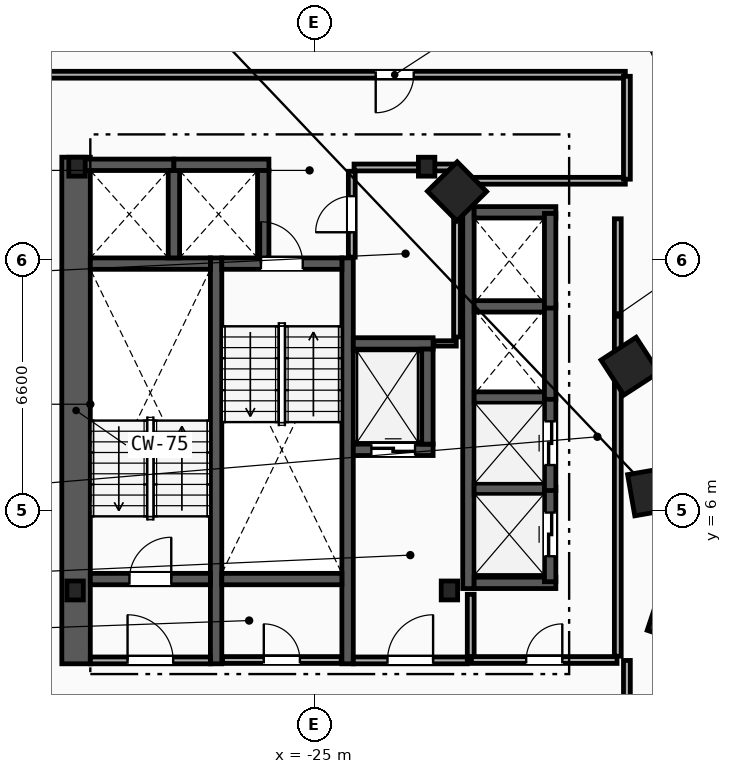
"""IFC4 building model, lengths in metres.
Left out: names, types, materials, properties, quantities, classifications, styles, units other than length and angle.
Written with IfcOpenShell. Run it as: python <this file> out.ifc"""

import sys

from ifc_helpers import new_model, si_unit, direction, frame, frame_2d, origin, origin_2d, place, context, subcontext, project, spatial, rectangle, i_section, extrude, element, fill, save


model = new_model("IFC4")
c1 = context("Model", 3, precision=1e-05, world=origin(), true_north=direction((0.0, 1.0)))
c2 = subcontext(c1, "Body", "Model", "MODEL_VIEW")
j1 = project(units=[si_unit("LENGTHUNIT", "METRE"), si_unit("PLANEANGLEUNIT", "RADIAN")], contexts=[c1])
p1 = place(None, origin())
s1 = spatial("IfcSite", under=j1, at=p1, CompositionType="ELEMENT")
p2 = place(p1, origin())
s2 = spatial("IfcBuilding", under=s1, at=p2, CompositionType="ELEMENT")
p3 = place(p2, frame((0.0, 0.0, 107.0)))
s3 = spatial("IfcBuildingStorey", under=s2, at=p3, CompositionType="ELEMENT", Elevation=107.0)
for number, where, z_axis, x_axis in (
    (1, (-31.3, 3.9, 0.0), (0.0, 0.0, 1.0), (1.0, 0.0, 0.0)),
    (2, (-21.45, 3.9, 0.0), (0.0, 0.0, 1.0), (1.0, 0.0, 0.0)),
    (3, (-22.05, 15.05, 0.0), (0.0, 0.0, 1.0), (1.0, 0.0, 0.0)),
    (4, (-31.25, 15.05, 0.0), (0.0, 0.0, 1.0), (1.0, 0.0, 0.0)),
):
    element("IfcColumn", number, at=place(p3, frame(where, z_axis=z_axis, x_axis=x_axis)), inside=s3, PredefinedType="COLUMN", context=c2, shape_type="SweptSolid", body=[
        extrude(i_section(OverallWidth=0.432, OverallDepth=0.498, WebThickness=0.056, FlangeThickness=0.089, FilletRadius=0.018, at=origin_2d()), origin(), (0.0, 0.0, 1.0), 3.6),
    ])
for number, where, z_axis, x_axis in (
    (5, (-15.55, 3.2, 0.0), (0.0, 0.0, 1.0), (0.315, 0.949, 0.0)),
    (6, (-16.125, 6.5, 0.0), (0.0, 0.0, 1.0), (-0.172, 0.985, 0.0)),
    (7, (-16.7, 9.8, 0.0), (0.0, 0.0, 1.0), (-0.544, 0.839, 0.0)),
    (8, (-21.25, 14.4, 0.0), (0.0, 0.0, 1.0), (-0.703, 0.711, 0.0)),
):
    element("IfcColumn", number, at=place(p3, frame(where, z_axis=z_axis, x_axis=x_axis)), inside=s3, PredefinedType="COLUMN", context=c2, shape_type="SweptSolid", body=[
        extrude(rectangle(XDim=1.1, YDim=1.1, at=origin_2d()), origin(), (0.0, 0.0, 1.0), 3.6),
    ])
p4 = place(p3, frame((-31.275, 1.97, 0.0), z_axis=(0.0, 0.0, 1.0), x_axis=(0.0, 1.0, 0.0)))
e9 = element("IfcWall", 9, at=p4, inside=s3, PredefinedType="SHEAR", context=c2, shape_type="SweptSolid", body=[
    extrude(rectangle(XDim=13.33, YDim=0.75, at=frame_2d((6.665, 0.0))), origin(), (0.0, 0.0, 1.0), 3.3),
])
for number, where, z_axis, x_axis in (
    (10, (-27.59, 1.97, 0.0), (0.0, 0.0, 1.0), (0.0, 1.0, 0.0)),
    (11, (-24.13, 1.97, 0.0), (0.0, 0.0, 1.0), (0.0, 1.0, 0.0)),
):
    element("IfcWall", number, at=place(p3, frame(where, z_axis=z_axis, x_axis=x_axis)), inside=s3, PredefinedType="SHEAR", context=c2, shape_type="SweptSolid", body=[
        extrude(rectangle(XDim=10.68, YDim=0.3, at=frame_2d((5.34, 0.0))), origin(), (0.0, 0.0, 1.0), 3.3),
    ])
p5 = place(p3, frame((-30.9, 4.2, 0.0), z_axis=(0.0, 0.0, 1.0), x_axis=(1.0, 0.0, 0.0)))
e12 = element("IfcWall", 12, at=p5, inside=s3, PredefinedType="SHEAR", context=c2, shape_type="SweptSolid", body=[
    extrude(rectangle(XDim=3.16, YDim=0.3, at=frame_2d((1.58, 0.0))), origin(), (0.0, 0.0, 1.0), 3.3),
])
p6 = place(p5, frame((1.03, 0.0, 0.0)))
e13 = element("IfcOpeningElement", 13, at=p6, cuts=e12, PredefinedType="OPENING", context=c2, shape_type="SweptSolid", body=[
    extrude(rectangle(XDim=1.1, YDim=2.15, at=frame_2d((0.55, 1.075))), frame((0.0, 0.16, 0.0), z_axis=(0.0, -1.0, 0.0), x_axis=(1.0, 0.0, 0.0)), (0.0, 0.0, 1.0), 0.32),
])
p7 = place(p3, frame((-30.9, 12.5, 0.0), z_axis=(0.0, 0.0, 1.0), x_axis=(1.0, 0.0, 0.0)))
e14 = element("IfcWall", 14, at=p7, inside=s3, PredefinedType="SHEAR", context=c2, shape_type="SweptSolid", body=[
    extrude(rectangle(XDim=3.16, YDim=0.3, at=frame_2d((1.58, 0.0))), origin(), (0.0, 0.0, 1.0), 3.3),
])
p8 = place(p3, frame((-27.44, 12.5, 0.0), z_axis=(0.0, 0.0, 1.0), x_axis=(1.0, 0.0, 0.0)))
e15 = element("IfcWall", 15, at=p8, inside=s3, PredefinedType="SHEAR", context=c2, shape_type="SweptSolid", body=[
    extrude(rectangle(XDim=3.16, YDim=0.3, at=frame_2d((1.58, 0.0))), origin(), (0.0, 0.0, 1.0), 3.3),
])
p9 = place(p8, frame((1.03, 0.0, 0.0)))
e16 = element("IfcOpeningElement", 16, at=p9, cuts=e15, PredefinedType="OPENING", context=c2, shape_type="SweptSolid", body=[
    extrude(rectangle(XDim=1.1, YDim=2.15, at=frame_2d((0.55, 1.075))), frame((0.0, 0.16, 0.0), z_axis=(0.0, -1.0, 0.0), x_axis=(1.0, 0.0, 0.0)), (0.0, 0.0, 1.0), 0.32),
])
p10 = place(p3, frame((-27.44, 4.2, 0.0), z_axis=(0.0, 0.0, 1.0), x_axis=(1.0, 0.0, 0.0)))
e17 = element("IfcWall", 17, at=p10, inside=s3, PredefinedType="SHEAR", context=c2, shape_type="SweptSolid", body=[
    extrude(rectangle(XDim=3.16, YDim=0.3, at=frame_2d((1.58, 0.0))), origin(), (0.0, 0.0, 1.0), 3.3),
])
p11 = place(p3, frame((-20.89, 2.15, 0.0), z_axis=(0.0, 0.0, 1.0), x_axis=(0.0, 1.0, 0.0)))
e18 = element("IfcWall", 18, at=p11, inside=s3, PredefinedType="PARTITIONING", context=c2, shape_type="SweptSolid", body=[
    extrude(rectangle(XDim=1.65, YDim=0.18, at=frame_2d((0.825, 0.0))), origin(), (0.0, 0.0, 1.0), 3.3),
])
p12 = place(p3, frame((-23.98, 2.06, 0.0), z_axis=(0.0, 0.0, 1.0), x_axis=(1.0, 0.0, 0.0)))
e19 = element("IfcWall", 19, at=p12, inside=s3, PredefinedType="PARTITIONING", context=c2, shape_type="SweptSolid", body=[
    extrude(rectangle(XDim=3.0, YDim=0.18, at=frame_2d((1.5, 0.0))), origin(), (0.0, 0.0, 1.0), 3.3),
])
p13 = place(p12, frame((0.9, 0.0, 0.0)))
e20 = element("IfcOpeningElement", 20, at=p13, cuts=e19, PredefinedType="OPENING", context=c2, shape_type="SweptSolid", body=[
    extrude(rectangle(XDim=1.2, YDim=2.15, at=frame_2d((0.6, 1.075))), frame((0.0, 0.1, 0.0), z_axis=(0.0, -1.0, 0.0), x_axis=(1.0, 0.0, 0.0)), (0.0, 0.0, 1.0), 0.2),
])
p14 = place(p3, frame((-30.9, 2.06, 0.0), z_axis=(0.0, 0.0, 1.0), x_axis=(1.0, 0.0, 0.0)))
e21 = element("IfcWall", 21, at=p14, inside=s3, PredefinedType="PARTITIONING", context=c2, shape_type="SweptSolid", body=[
    extrude(rectangle(XDim=3.16, YDim=0.18, at=frame_2d((1.58, 0.0))), origin(), (0.0, 0.0, 1.0), 3.3),
])
p15 = place(p14, frame((0.98, 0.0, 0.0)))
e22 = element("IfcOpeningElement", 22, at=p15, cuts=e21, PredefinedType="OPENING", context=c2, shape_type="SweptSolid", body=[
    extrude(rectangle(XDim=1.2, YDim=2.15, at=frame_2d((0.6, 1.075))), frame((0.0, 0.1, 0.0), z_axis=(0.0, -1.0, 0.0), x_axis=(1.0, 0.0, 0.0)), (0.0, 0.0, 1.0), 0.2),
])
p16 = place(p3, frame((-23.98, 7.6, 0.0), z_axis=(0.0, 0.0, 1.0), x_axis=(1.0, 0.0, 0.0)))
e23 = element("IfcWall", 23, at=p16, inside=s3, PredefinedType="SHEAR", context=c2, shape_type="SweptSolid", body=[
    extrude(rectangle(XDim=2.1, YDim=0.3, at=frame_2d((1.05, 0.0))), origin(), (0.0, 0.0, 1.0), 3.3),
])
p17 = place(p16, frame((0.475, 0.0, 0.0)))
e24 = element("IfcOpeningElement", 24, at=p17, cuts=e23, PredefinedType="OPENING", context=c2, shape_type="SweptSolid", body=[
    extrude(rectangle(XDim=1.15, YDim=2.2, at=frame_2d((0.575, 1.1))), frame((0.0, 0.16, 0.0), z_axis=(0.0, -1.0, 0.0), x_axis=(1.0, 0.0, 0.0)), (0.0, 0.0, 1.0), 0.32),
])
p18 = place(p3, frame((-23.98, 10.4, 0.0), z_axis=(0.0, 0.0, 1.0), x_axis=(1.0, 0.0, 0.0)))
e25 = element("IfcWall", 25, at=p18, inside=s3, PredefinedType="SHEAR", context=c2, shape_type="SweptSolid", body=[
    extrude(rectangle(XDim=2.1, YDim=0.3, at=frame_2d((1.05, 0.0))), origin(), (0.0, 0.0, 1.0), 3.3),
])
for number, where, z_axis, x_axis in (
    (26, (-22.03, 7.75, 0.0), (0.0, 0.0, 1.0), (0.0, 1.0, 0.0)),
    (27, (-31.2, 15.1, 0.0), (0.0, 0.0, 1.0), (1.0, 0.0, 0.0)),
):
    element("IfcWall", number, at=place(p3, frame(where, z_axis=z_axis, x_axis=x_axis)), inside=s3, PredefinedType="SHEAR", context=c2, shape_type="SweptSolid", body=[
        extrude(rectangle(XDim=2.5, YDim=0.3, at=frame_2d((1.25, 0.0))), origin(), (0.0, 0.0, 1.0), 3.3),
    ])
p19 = place(p3, frame((-28.7, 12.65, 0.0), z_axis=(0.0, 0.0, 1.0), x_axis=(0.0, 1.0, 0.0)))
e28 = element("IfcWall", 28, at=p19, inside=s3, PredefinedType="SHEAR", context=c2, shape_type="SweptSolid", body=[
    extrude(rectangle(XDim=2.3, YDim=0.3, at=frame_2d((1.15, 0.0))), origin(), (0.0, 0.0, 1.0), 3.3),
])
p20 = place(p3, frame((-28.7, 15.1, 0.0), z_axis=(0.0, 0.0, 1.0), x_axis=(1.0, 0.0, 0.0)))
e29 = element("IfcWall", 29, at=p20, inside=s3, PredefinedType="SHEAR", context=c2, shape_type="SweptSolid", body=[
    extrude(rectangle(XDim=2.5, YDim=0.3, at=frame_2d((1.25, 0.0))), origin(), (0.0, 0.0, 1.0), 3.3),
])
p21 = place(p3, frame((-26.35, 12.65, 0.0), z_axis=(0.0, 0.0, 1.0), x_axis=(0.0, 1.0, 0.0)))
e30 = element("IfcWall", 30, at=p21, inside=s3, PredefinedType="SHEAR", context=c2, shape_type="SweptSolid", body=[
    extrude(rectangle(XDim=2.3, YDim=0.3, at=frame_2d((1.15, 0.0))), origin(), (0.0, 0.0, 1.0), 3.3),
])
p22 = place(p3, frame((-20.95, 3.95, 0.0), z_axis=(0.0, 0.0, 1.0), x_axis=(0.0, 1.0, 0.0)))
e31 = element("IfcWall", 31, at=p22, inside=s3, PredefinedType="SHEAR", context=c2, shape_type="SweptSolid", body=[
    extrude(rectangle(XDim=10.05, YDim=0.3, at=frame_2d((5.025, 0.0))), origin(), (0.0, 0.0, 1.0), 3.3),
])
for number, where, z_axis, x_axis in (
    (32, (-20.8, 4.1, 0.0), (0.0, 0.0, 1.0), (1.0, 0.0, 0.0)),
    (33, (-20.8, 13.85, 0.0), (0.0, 0.0, 1.0), (1.0, 0.0, 0.0)),
):
    element("IfcWall", number, at=place(p3, frame(where, z_axis=z_axis, x_axis=x_axis)), inside=s3, PredefinedType="SHEAR", context=c2, shape_type="SweptSolid", body=[
        extrude(rectangle(XDim=2.15, YDim=0.3, at=frame_2d((1.075, 0.0))), origin(), (0.0, 0.0, 1.0), 3.3),
    ])
for number, where, z_axis, x_axis in (
    (34, (-20.8, 6.575, 0.0), (0.0, 0.0, 1.0), (1.0, 0.0, 0.0)),
    (35, (-20.8, 8.975, 0.0), (0.0, 0.0, 1.0), (1.0, 0.0, 0.0)),
    (36, (-20.8, 11.375, 0.0), (0.0, 0.0, 1.0), (1.0, 0.0, 0.0)),
):
    element("IfcWall", number, at=place(p3, frame(where, z_axis=z_axis, x_axis=x_axis)), inside=s3, PredefinedType="SHEAR", context=c2, shape_type="SweptSolid", body=[
        extrude(rectangle(XDim=1.85, YDim=0.3, at=frame_2d((0.925, 0.0))), origin(), (0.0, 0.0, 1.0), 3.3),
    ])
p23 = place(p3, frame((-18.8, 4.13, 0.0), z_axis=(0.0, 0.0, 1.0), x_axis=(0.0, 1.0, 0.0)))
e37 = element("IfcWall", 37, at=p23, inside=s3, PredefinedType="SHEAR", context=c2, shape_type="SweptSolid", body=[
    extrude(rectangle(XDim=2.49, YDim=0.3, at=frame_2d((1.245, 0.0))), origin(), (0.0, 0.0, 1.0), 3.3),
])
p24 = place(p23, frame((0.67, 0.0, 0.0)))
e38 = element("IfcOpeningElement", 38, at=p24, cuts=e37, PredefinedType="OPENING", context=c2, shape_type="SweptSolid", body=[
    extrude(rectangle(XDim=1.15, YDim=2.2, at=frame_2d((0.575, 1.1))), frame((0.0, 0.16, 0.0), z_axis=(0.0, -1.0, 0.0), x_axis=(1.0, 0.0, 0.0)), (0.0, 0.0, 1.0), 0.32),
])
p25 = place(p3, frame((-18.8, 6.53, 0.0), z_axis=(0.0, 0.0, 1.0), x_axis=(0.0, 1.0, 0.0)))
e39 = element("IfcWall", 39, at=p25, inside=s3, PredefinedType="SHEAR", context=c2, shape_type="SweptSolid", body=[
    extrude(rectangle(XDim=2.49, YDim=0.3, at=frame_2d((1.245, 0.0))), origin(), (0.0, 0.0, 1.0), 3.3),
])
p26 = place(p25, frame((0.67, 0.0, 0.0)))
e40 = element("IfcOpeningElement", 40, at=p26, cuts=e39, PredefinedType="OPENING", context=c2, shape_type="SweptSolid", body=[
    extrude(rectangle(XDim=1.15, YDim=2.2, at=frame_2d((0.575, 1.1))), frame((0.0, 0.16, 0.0), z_axis=(0.0, -1.0, 0.0), x_axis=(1.0, 0.0, 0.0)), (0.0, 0.0, 1.0), 0.32),
])
for number, where, z_axis, x_axis in (
    (41, (-18.8, 8.93, 0.0), (0.0, 0.0, 1.0), (0.0, 1.0, 0.0)),
    (42, (-18.8, 11.33, 0.0), (0.0, 0.0, 1.0), (0.0, 1.0, 0.0)),
):
    element("IfcWall", number, at=place(p3, frame(where, z_axis=z_axis, x_axis=x_axis)), inside=s3, PredefinedType="SHEAR", context=c2, shape_type="SweptSolid", body=[
        extrude(rectangle(XDim=2.49, YDim=0.3, at=frame_2d((1.245, 0.0))), origin(), (0.0, 0.0, 1.0), 3.3),
    ])
p27 = place(p3, frame((-17.02, 2.17, 0.0), z_axis=(0.0, 0.0, 1.0), x_axis=(0.0, 1.0, 0.0)))
e43 = element("IfcWall", 43, at=p27, inside=s3, PredefinedType="PARTITIONING", context=c2, shape_type="SweptSolid", body=[
    extrude(rectangle(XDim=11.51, YDim=0.18, at=frame_2d((5.755, 0.0))), origin(), (0.0, 0.0, 1.0), 3.3),
])
p28 = place(p3, frame((-20.87, 2.07, 0.0), z_axis=(0.0, 0.0, 1.0), x_axis=(1.0, 0.0, 0.0)))
e44 = element("IfcWall", 44, at=p28, inside=s3, PredefinedType="PARTITIONING", context=c2, shape_type="SweptSolid", body=[
    extrude(rectangle(XDim=3.83, YDim=0.18, at=frame_2d((1.915, 0.0))), origin(), (0.0, 0.0, 1.0), 3.3),
])
p29 = place(p28, frame((1.44, 0.0, 0.0)))
e45 = element("IfcOpeningElement", 45, at=p29, cuts=e44, PredefinedType="OPENING", context=c2, shape_type="SweptSolid", body=[
    extrude(rectangle(XDim=0.95, YDim=2.1, at=frame_2d((0.475, 1.05))), frame((0.0, 0.1, 0.0), z_axis=(0.0, -1.0, 0.0), x_axis=(1.0, 0.0, 0.0)), (0.0, 0.0, 1.0), 0.2),
])
p30 = place(p3, frame((-21.86, 10.4, 0.0), z_axis=(0.0, 0.0, 1.0), x_axis=(1.0, 0.0, 0.0)))
e46 = element("IfcWall", 46, at=p30, inside=s3, PredefinedType="PARTITIONING", context=c2, shape_type="SweptSolid", body=[
    extrude(rectangle(XDim=0.59, YDim=0.14, at=frame_2d((0.295, 0.0))), origin(), (0.0, 0.0, 1.0), 3.3),
])
p31 = place(p3, frame((-21.25, 10.57, 0.0), z_axis=(0.0, 0.0, 1.0), x_axis=(0.0, 1.0, 0.0)))
e47 = element("IfcWall", 47, at=p31, inside=s3, PredefinedType="PARTITIONING", context=c2, shape_type="SweptSolid", body=[
    extrude(rectangle(XDim=4.36, YDim=0.18, at=frame_2d((2.18, 0.0))), origin(), (0.0, 0.0, 1.0), 3.3),
])
p32 = place(p3, frame((-23.96, 15.03, 0.0), z_axis=(0.0, 0.0, 1.0), x_axis=(1.0, 0.0, 0.0)))
e48 = element("IfcWall", 48, at=p32, inside=s3, PredefinedType="PARTITIONING", context=c2, shape_type="SweptSolid", body=[
    extrude(rectangle(XDim=2.61, YDim=0.18, at=frame_2d((1.305, 0.0))), origin(), (0.0, 0.0, 1.0), 2.373),
])
p33 = place(p3, frame((-27.42, 2.07, 0.0), z_axis=(0.0, 0.0, 1.0), x_axis=(1.0, 0.0, 0.0)))
e49 = element("IfcWall", 49, at=p33, inside=s3, PredefinedType="PARTITIONING", context=c2, shape_type="SweptSolid", body=[
    extrude(rectangle(XDim=3.12, YDim=0.18, at=frame_2d((1.56, 0.0))), origin(), (0.0, 0.0, 1.0), 3.3),
])
p34 = place(p33, frame((1.085, 0.0, 0.0)))
e50 = element("IfcOpeningElement", 50, at=p34, cuts=e49, PredefinedType="OPENING", context=c2, shape_type="SweptSolid", body=[
    extrude(rectangle(XDim=0.95, YDim=2.1, at=frame_2d((0.475, 1.05))), frame((0.0, 0.1, 0.0), z_axis=(0.0, -1.0, 0.0), x_axis=(1.0, 0.0, 0.0)), (0.0, 0.0, 1.0), 0.2),
])
p35 = place(p3, frame((-24.02, 12.67, 0.0), z_axis=(0.0, 0.0, 1.0), x_axis=(0.0, 1.0, 0.0)))
e51 = element("IfcWall", 51, at=p35, inside=s3, PredefinedType="PARTITIONING", context=c2, shape_type="SweptSolid", body=[
    extrude(rectangle(XDim=2.26, YDim=0.18, at=frame_2d((1.13, 0.0))), origin(), (0.0, 0.0, 1.0), 3.3),
])
p36 = place(p35, frame((0.655, 0.0, 0.0)))
e52 = element("IfcOpeningElement", 52, at=p36, cuts=e51, PredefinedType="OPENING", context=c2, shape_type="SweptSolid", body=[
    extrude(rectangle(XDim=0.95, YDim=2.1, at=frame_2d((0.475, 1.05))), frame((0.0, 0.1, 0.0), z_axis=(0.0, -1.0, 0.0), x_axis=(1.0, 0.0, 0.0)), (0.0, 0.0, 1.0), 0.2),
])
p37 = place(p3, frame((-16.822, 17.47, 0.0), z_axis=(0.0, 0.0, 1.0), x_axis=(-1.0, 0.0, 0.0)))
e53 = element("IfcWall", 53, at=p37, inside=s3, PredefinedType="PARTITIONING", context=c2, shape_type="SweptSolid", body=[
    extrude(rectangle(XDim=16.807, YDim=0.18, at=frame_2d((8.403, 0.0))), origin(), (0.0, 0.0, 1.0), 3.3),
])
p38 = place(p37, frame((5.569, 0.0, 0.0)))
e54 = element("IfcOpeningElement", 54, at=p38, cuts=e53, PredefinedType="OPENING", context=c2, shape_type="SweptSolid", body=[
    extrude(rectangle(XDim=1.0, YDim=2.15, at=frame_2d((0.5, 1.075))), frame((0.0, 0.1, 0.0), z_axis=(0.0, -1.0, 0.0), x_axis=(1.0, 0.0, 0.0)), (0.0, 0.0, 1.0), 0.2),
])
p39 = place(p3, frame((-21.178, 14.68, 0.0), z_axis=(0.0, 0.0, 1.0), x_axis=(1.0, 0.0, 0.0)))
e55 = element("IfcWall", 55, at=p39, inside=s3, PredefinedType="PARTITIONING", context=c2, shape_type="SweptSolid", body=[
    extrude(rectangle(XDim=4.357, YDim=0.18, at=frame_2d((2.178, 0.0))), origin(), (0.0, 0.0, 1.0), 3.3),
])
p40 = place(p3, frame((-16.78, 14.721, 0.0), z_axis=(0.0, 0.0, 1.0), x_axis=(0.0, 1.0, 0.0)))
e56 = element("IfcWall", 56, at=p40, inside=s3, PredefinedType="PARTITIONING", context=c2, shape_type="SweptSolid", body=[
    extrude(rectangle(XDim=2.707, YDim=0.18, at=frame_2d((1.354, 0.0))), origin(), (0.0, 0.0, 1.0), 3.3),
])
p41 = place(p3, frame((-16.78, -0.329, 0.0), z_axis=(0.0, 0.0, 1.0), x_axis=(0.0, 1.0, 0.0)))
e57 = element("IfcWall", 57, at=p41, inside=s3, PredefinedType="PARTITIONING", context=c2, shape_type="SweptSolid", body=[
    extrude(rectangle(XDim=2.387, YDim=0.18, at=frame_2d((1.194, 0.0))), origin(), (0.0, 0.0, 1.0), 3.3),
])
p42 = place(p6, origin())
e58 = element("IfcDoor", 58, at=p42, inside=s3, OperationType="SINGLE_SWING_RIGHT", PredefinedType="DOOR", context=c2, shape_type="SweptSolid", body=[
    extrude(rectangle(XDim=1.1, YDim=2.15, at=frame_2d((0.55, 1.075))), frame((0.0, 0.025, 0.0), z_axis=(0.0, -1.0, 0.0), x_axis=(1.0, 0.0, 0.0)), (0.0, 0.0, 1.0), 0.05),
])
fill(e13, e58)
p43 = place(p9, origin())
e59 = element("IfcDoor", 59, at=p43, inside=s3, OperationType="SINGLE_SWING_LEFT", PredefinedType="DOOR", context=c2, shape_type="SweptSolid", body=[
    extrude(rectangle(XDim=1.1, YDim=2.15, at=frame_2d((0.55, 1.075))), frame((0.0, 0.025, 0.0), z_axis=(0.0, -1.0, 0.0), x_axis=(1.0, 0.0, 0.0)), (0.0, 0.0, 1.0), 0.05),
])
fill(e16, e59)
p44 = place(p13, origin())
e60 = element("IfcDoor", 60, at=p44, inside=s3, OperationType="SINGLE_SWING_RIGHT", PredefinedType="DOOR", context=c2, shape_type="SweptSolid", body=[
    extrude(rectangle(XDim=1.2, YDim=2.15, at=frame_2d((0.6, 1.075))), frame((0.0, 0.025, 0.0), z_axis=(0.0, -1.0, 0.0), x_axis=(1.0, 0.0, 0.0)), (0.0, 0.0, 1.0), 0.05),
])
fill(e20, e60)
p45 = place(p15, origin())
e61 = element("IfcDoor", 61, at=p45, inside=s3, OperationType="SINGLE_SWING_LEFT", PredefinedType="DOOR", context=c2, shape_type="SweptSolid", body=[
    extrude(rectangle(XDim=1.2, YDim=2.15, at=frame_2d((0.6, 1.075))), frame((0.0, 0.025, 0.0), z_axis=(0.0, -1.0, 0.0), x_axis=(1.0, 0.0, 0.0)), (0.0, 0.0, 1.0), 0.05),
])
fill(e22, e61)
p46 = place(p17, origin())
e62 = element("IfcDoor", 62, at=p46, inside=s3, OperationType="SLIDING_TO_LEFT", PredefinedType="TRAPDOOR", context=c2, shape_type="SweptSolid", body=[
    extrude(rectangle(XDim=1.15, YDim=2.2, at=frame_2d((0.575, 1.1))), frame((0.0, 0.025, 0.0), z_axis=(0.0, -1.0, 0.0), x_axis=(1.0, 0.0, 0.0)), (0.0, 0.0, 1.0), 0.05),
])
fill(e24, e62)
p47 = place(p24, origin())
e63 = element("IfcDoor", 63, at=p47, inside=s3, OperationType="SLIDING_TO_LEFT", PredefinedType="TRAPDOOR", context=c2, shape_type="SweptSolid", body=[
    extrude(rectangle(XDim=1.15, YDim=2.2, at=frame_2d((0.575, 1.1))), frame((0.0, 0.025, 0.0), z_axis=(0.0, -1.0, 0.0), x_axis=(1.0, 0.0, 0.0)), (0.0, 0.0, 1.0), 0.05),
])
fill(e38, e63)
p48 = place(p26, origin())
e64 = element("IfcDoor", 64, at=p48, inside=s3, OperationType="SLIDING_TO_LEFT", PredefinedType="TRAPDOOR", context=c2, shape_type="SweptSolid", body=[
    extrude(rectangle(XDim=1.15, YDim=2.2, at=frame_2d((0.575, 1.1))), frame((0.0, 0.025, 0.0), z_axis=(0.0, -1.0, 0.0), x_axis=(1.0, 0.0, 0.0)), (0.0, 0.0, 1.0), 0.05),
])
fill(e40, e64)
p49 = place(p38, origin())
e65 = element("IfcDoor", 65, at=p49, inside=s3, OperationType="SINGLE_SWING_RIGHT", PredefinedType="DOOR", context=c2, shape_type="SweptSolid", body=[
    extrude(rectangle(XDim=1.0, YDim=2.15, at=frame_2d((0.5, 1.075))), frame((0.0, 0.025, 0.0), z_axis=(0.0, -1.0, 0.0), x_axis=(1.0, 0.0, 0.0)), (0.0, 0.0, 1.0), 0.05),
])
fill(e54, e65)
p50 = place(p29, origin())
e66 = element("IfcDoor", 66, at=p50, inside=s3, OperationType="SINGLE_SWING_RIGHT", PredefinedType="DOOR", context=c2, shape_type="SweptSolid", body=[
    extrude(rectangle(XDim=0.95, YDim=2.1, at=frame_2d((0.475, 1.05))), frame((0.0, 0.025, 0.0), z_axis=(0.0, -1.0, 0.0), x_axis=(1.0, 0.0, 0.0)), (0.0, 0.0, 1.0), 0.05),
])
fill(e45, e66)
p51 = place(p34, origin())
e67 = element("IfcDoor", 67, at=p51, inside=s3, OperationType="SINGLE_SWING_LEFT", PredefinedType="DOOR", context=c2, shape_type="SweptSolid", body=[
    extrude(rectangle(XDim=0.95, YDim=2.1, at=frame_2d((0.475, 1.05))), frame((0.0, 0.025, 0.0), z_axis=(0.0, -1.0, 0.0), x_axis=(1.0, 0.0, 0.0)), (0.0, 0.0, 1.0), 0.05),
])
fill(e50, e67)
p52 = place(p36, origin())
e68 = element("IfcDoor", 68, at=p52, inside=s3, OperationType="SINGLE_SWING_LEFT", PredefinedType="DOOR", context=c2, shape_type="SweptSolid", body=[
    extrude(rectangle(XDim=0.95, YDim=2.1, at=frame_2d((0.475, 1.05))), frame((0.0, 0.025, 0.0), z_axis=(0.0, -1.0, 0.0), x_axis=(1.0, 0.0, 0.0)), (0.0, 0.0, 1.0), 0.05),
])
fill(e52, e68)
save(model, sys.argv[1])
